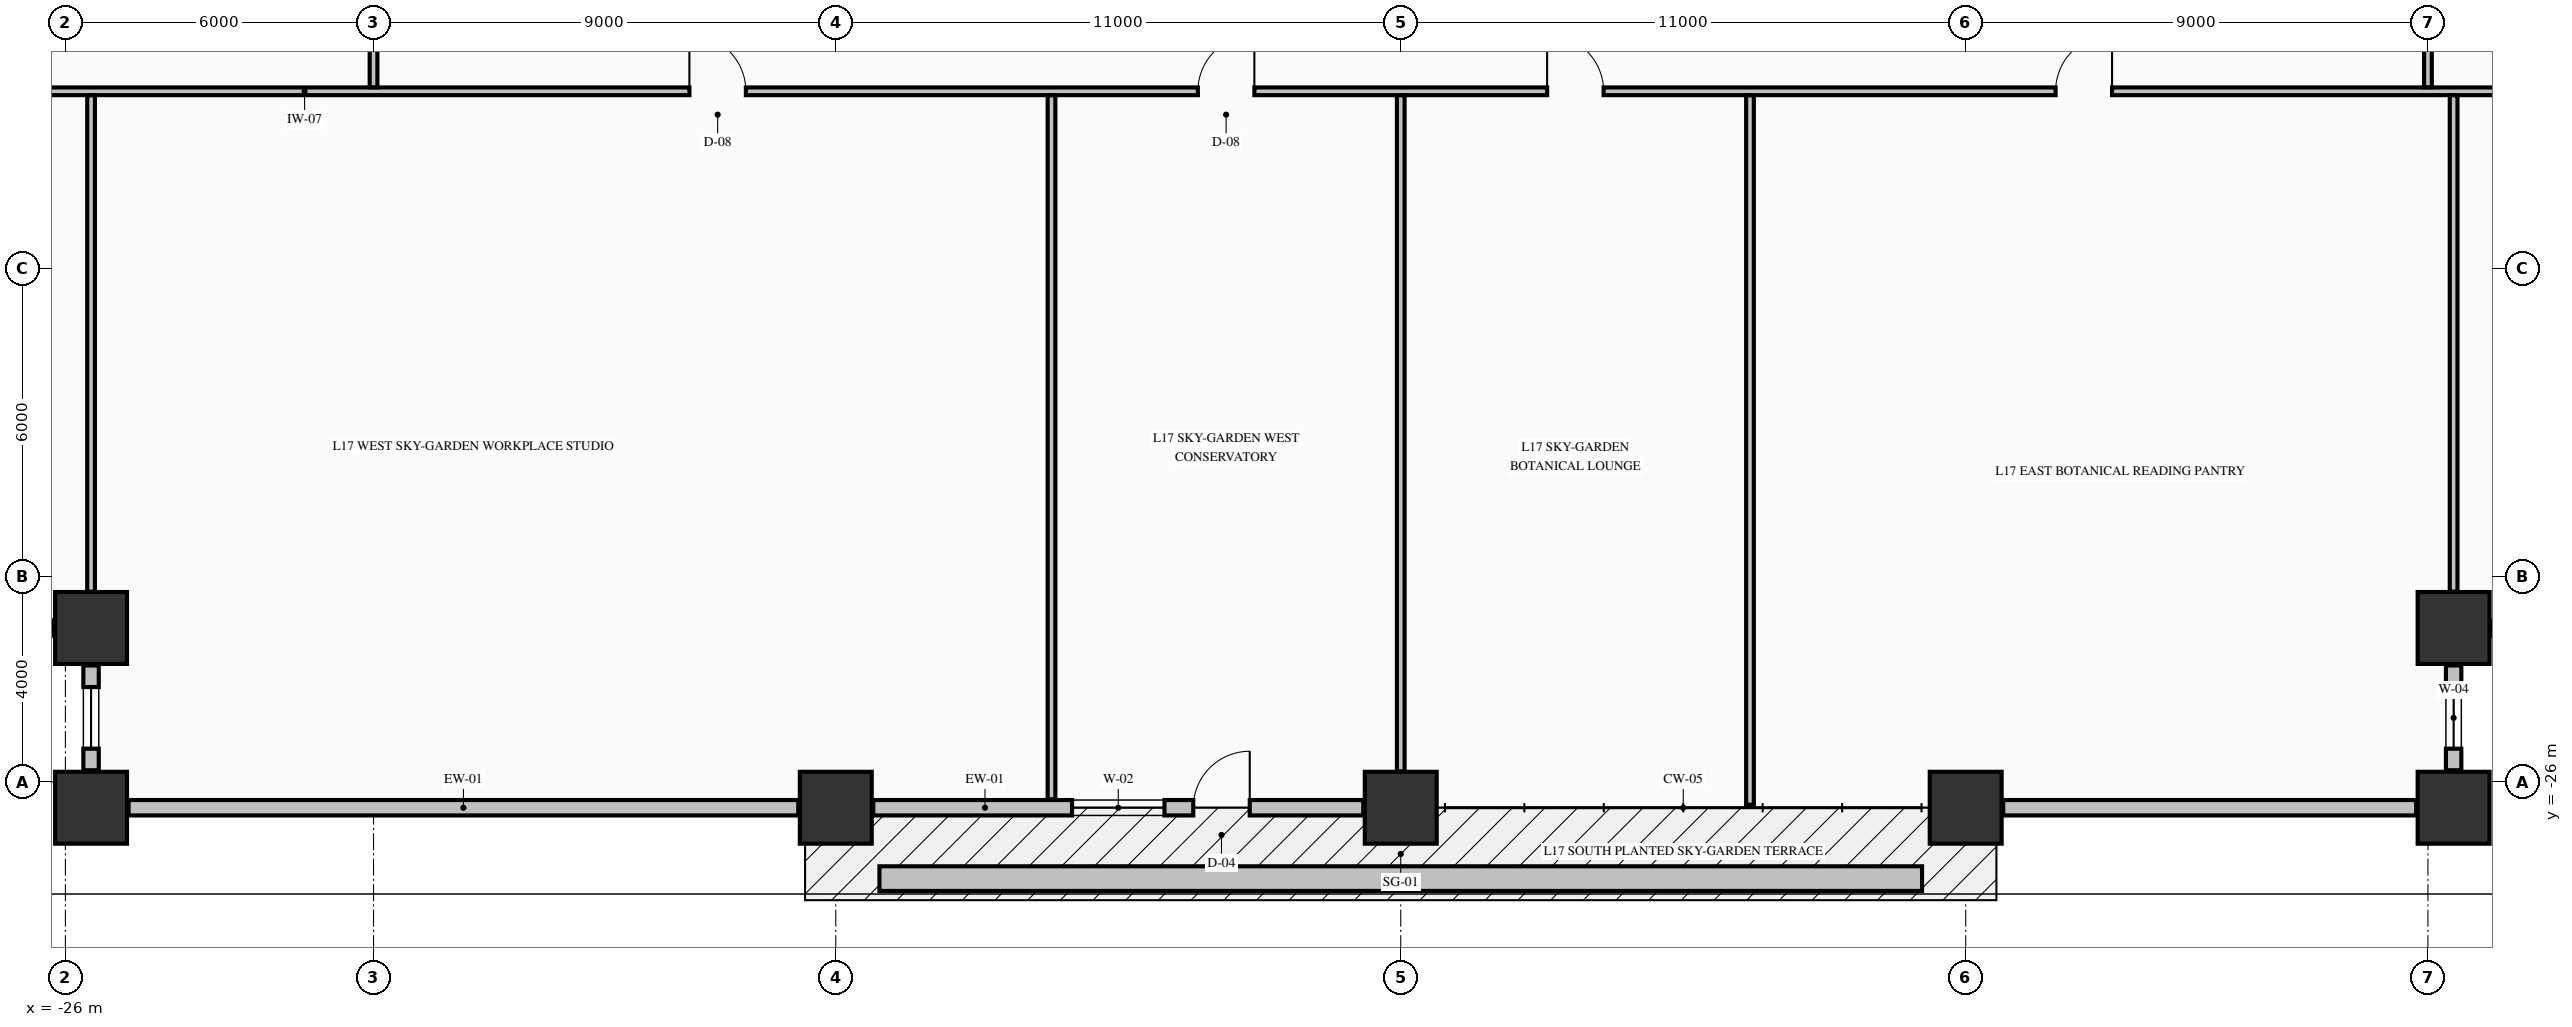
"""IFC4 building model, lengths in metres.
Left out: names, types, materials, properties, quantities, classifications, styles, units other than length and angle.
Written with IfcOpenShell. Run it as: python <this file> out.ifc"""

import sys

from ifc_helpers import new_model, si_unit, direction, frame, frame_2d, origin, origin_2d, place, context, subcontext, project, spatial, rectangle, extrude, element, fill, save


model = new_model("IFC4")
c1 = context("Model", 3, precision=1e-05, world=origin(), true_north=direction((0.0, 1.0)))
c2 = subcontext(c1, "Body", "Model", "MODEL_VIEW")
j1 = project(units=[si_unit("LENGTHUNIT", "METRE"), si_unit("PLANEANGLEUNIT", "RADIAN")], contexts=[c1])
p1 = place(None, origin())
s1 = spatial("IfcSite", under=j1, at=p1, CompositionType="ELEMENT")
p2 = place(p1, origin())
s2 = spatial("IfcBuilding", under=s1, at=p2, CompositionType="ELEMENT")
p3 = place(p2, frame((0.0, 0.0, 71.47)))
s3 = spatial("IfcBuildingStorey", under=s2, at=p3, CompositionType="ELEMENT", Elevation=71.47)
for number, where, z_axis, x_axis in (
    (1, (-25.5, -26.5, -0.325), (0.0, 0.0, 1.0), (1.0, 0.0, 0.0)),
    (2, (-11.0, -26.5, -0.325), (0.0, 0.0, 1.0), (1.0, 0.0, 0.0)),
    (3, (0.0, -26.5, -0.325), (0.0, 0.0, 1.0), (1.0, 0.0, 0.0)),
    (4, (11.0, -26.5, -0.325), (0.0, 0.0, 1.0), (1.0, 0.0, 0.0)),
    (5, (20.5, -26.5, -0.325), (0.0, 0.0, 1.0), (1.0, 0.0, 0.0)),
    (6, (-25.5, -23.0, -0.325), (0.0, 0.0, 1.0), (1.0, 0.0, 0.0)),
    (7, (20.5, -23.0, -0.325), (0.0, 0.0, 1.0), (1.0, 0.0, 0.0)),
):
    element("IfcColumn", number, at=place(p3, frame(where, z_axis=z_axis, x_axis=x_axis)), inside=s3, PredefinedType="COLUMN", context=c2, shape_type="SweptSolid", body=[
        extrude(rectangle(XDim=1.4, YDim=1.4, at=origin_2d()), origin(), (0.0, 0.0, 1.0), 3.645),
    ])
p4 = place(p3, frame((20.5, -25.77, 0.0), z_axis=(0.0, 0.0, 1.0), x_axis=(0.0, 1.0, 0.0)))
e8 = element("IfcWall", 8, at=p4, inside=s3, PredefinedType="STANDARD", context=c2, shape_type="SweptSolid", body=[
    extrude(rectangle(XDim=2.04, YDim=0.3, at=frame_2d((1.02, 0.0))), origin(), (0.0, 0.0, 1.0), 2.712),
])
p5 = place(p4, frame((0.42, 0.0, 0.82)))
e9 = element("IfcOpeningElement", 9, at=p5, cuts=e8, PredefinedType="OPENING", context=c2, shape_type="SweptSolid", body=[
    extrude(rectangle(XDim=1.2, YDim=1.65, at=frame_2d((0.6, 0.825))), frame((0.0, 0.16, 0.0), z_axis=(0.0, -1.0, 0.0), x_axis=(1.0, 0.0, 0.0)), (0.0, 0.0, 1.0), 0.32),
])
p6 = place(p3, frame((21.23, -23.0, 0.0), z_axis=(0.0, 0.0, 1.0), x_axis=(1.0, 0.0, 0.0)))
e10 = element("IfcWall", 10, at=p6, inside=s3, PredefinedType="STANDARD", context=c2, shape_type="SweptSolid", body=[
    extrude(rectangle(XDim=2.04, YDim=0.3, at=frame_2d((1.02, 0.0))), origin(), (0.0, 0.0, 1.0), 2.712),
])
p7 = place(p6, frame((0.42, 0.0, 0.82)))
e11 = element("IfcOpeningElement", 11, at=p7, cuts=e10, PredefinedType="OPENING", context=c2, shape_type="SweptSolid", body=[
    extrude(rectangle(XDim=1.2, YDim=1.65, at=frame_2d((0.6, 0.825))), frame((0.0, 0.16, 0.0), z_axis=(0.0, -1.0, 0.0), x_axis=(1.0, 0.0, 0.0)), (0.0, 0.0, 1.0), 0.32),
])
p8 = place(p3, frame((-28.27, -23.0, 0.0), z_axis=(0.0, 0.0, 1.0), x_axis=(1.0, 0.0, 0.0)))
e12 = element("IfcWall", 12, at=p8, inside=s3, PredefinedType="STANDARD", context=c2, shape_type="SweptSolid", body=[
    extrude(rectangle(XDim=2.04, YDim=0.3, at=frame_2d((1.02, 0.0))), origin(), (0.0, 0.0, 1.0), 2.712),
])
p9 = place(p8, frame((0.42, 0.0, 0.82)))
e13 = element("IfcOpeningElement", 13, at=p9, cuts=e12, PredefinedType="OPENING", context=c2, shape_type="SweptSolid", body=[
    extrude(rectangle(XDim=1.2, YDim=1.65, at=frame_2d((0.6, 0.825))), frame((0.0, 0.16, 0.0), z_axis=(0.0, -1.0, 0.0), x_axis=(1.0, 0.0, 0.0)), (0.0, 0.0, 1.0), 0.32),
])
p10 = place(p3, frame((-25.5, -23.73, 0.0), z_axis=(0.0, 0.0, 1.0), x_axis=(0.0, -1.0, 0.0)))
e14 = element("IfcWall", 14, at=p10, inside=s3, PredefinedType="STANDARD", context=c2, shape_type="SweptSolid", body=[
    extrude(rectangle(XDim=2.04, YDim=0.3, at=frame_2d((1.02, 0.0))), origin(), (0.0, 0.0, 1.0), 2.712),
])
p11 = place(p10, frame((0.42, 0.0, 0.82)))
e15 = element("IfcOpeningElement", 15, at=p11, cuts=e14, PredefinedType="OPENING", context=c2, shape_type="SweptSolid", body=[
    extrude(rectangle(XDim=1.2, YDim=1.65, at=frame_2d((0.6, 0.825))), frame((0.0, 0.16, 0.0), z_axis=(0.0, -1.0, 0.0), x_axis=(1.0, 0.0, 0.0)), (0.0, 0.0, 1.0), 0.32),
])
p12 = place(p3, frame((-24.77, -26.5, 0.0), z_axis=(0.0, 0.0, 1.0), x_axis=(1.0, 0.0, 0.0)))
e16 = element("IfcWall", 16, at=p12, inside=s3, PredefinedType="STANDARD", context=c2, shape_type="SweptSolid", body=[
    extrude(rectangle(XDim=13.04, YDim=0.3, at=frame_2d((6.52, 0.0))), origin(), (0.0, 0.0, 1.0), 2.712),
])
p13 = place(p3, frame((-10.27, -26.5, 0.0), z_axis=(0.0, 0.0, 1.0), x_axis=(1.0, 0.0, 0.0)))
e17 = element("IfcWall", 17, at=p13, inside=s3, PredefinedType="STANDARD", context=c2, shape_type="SweptSolid", body=[
    extrude(rectangle(XDim=9.54, YDim=0.3, at=frame_2d((4.77, 0.0))), origin(), (0.0, 0.0, 1.0), 2.712),
])
p14 = place(p13, frame((6.23, 0.0, 0.0)))
e18 = element("IfcOpeningElement", 18, at=p14, cuts=e17, PredefinedType="OPENING", context=c2, shape_type="SweptSolid", body=[
    extrude(rectangle(XDim=1.1, YDim=2.15, at=frame_2d((0.55, 1.075))), frame((0.0, 0.16, 0.0), z_axis=(0.0, -1.0, 0.0), x_axis=(1.0, 0.0, 0.0)), (0.0, 0.0, 1.0), 0.32),
])
p15 = place(p13, frame((3.87, 0.0, 0.78)))
e19 = element("IfcOpeningElement", 19, at=p15, cuts=e17, PredefinedType="OPENING", context=c2, shape_type="SweptSolid", body=[
    extrude(rectangle(XDim=1.8, YDim=1.72, at=frame_2d((0.9, 0.86))), frame((0.0, 0.16, 0.0), z_axis=(0.0, -1.0, 0.0), x_axis=(1.0, 0.0, 0.0)), (0.0, 0.0, 1.0), 0.32),
])
p16 = place(p3, frame((11.73, -26.5, 0.0), z_axis=(0.0, 0.0, 1.0), x_axis=(1.0, 0.0, 0.0)))
e20 = element("IfcWall", 20, at=p16, inside=s3, PredefinedType="STANDARD", context=c2, shape_type="SweptSolid", body=[
    extrude(rectangle(XDim=8.04, YDim=0.3, at=frame_2d((4.02, 0.0))), origin(), (0.0, 0.0, 1.0), 2.712),
])
p17 = place(p3, frame((-28.835, -12.55, 0.0), z_axis=(0.0, 0.0, 1.0), x_axis=(1.0, 0.0, 0.0)))
e21 = element("IfcWall", 21, at=p17, inside=s3, PredefinedType="PARTITIONING", context=c2, shape_type="SweptSolid", body=[
    extrude(rectangle(XDim=52.67, YDim=0.15, at=frame_2d((26.335, 0.0))), origin(), (0.0, 0.0, 1.0), 3.32),
])
p18 = place(p17, frame((14.985, 0.0, 0.0)))
e22 = element("IfcOpeningElement", 22, at=p18, cuts=e21, PredefinedType="OPENING", context=c2, shape_type="SweptSolid", body=[
    extrude(rectangle(XDim=1.1, YDim=2.15, at=frame_2d((0.55, 1.075))), frame((0.0, 0.085, 0.0), z_axis=(0.0, -1.0, 0.0), x_axis=(1.0, 0.0, 0.0)), (0.0, 0.0, 1.0), 0.17),
])
p19 = place(p17, frame((24.885, 0.0, 0.0)))
e23 = element("IfcOpeningElement", 23, at=p19, cuts=e21, PredefinedType="OPENING", context=c2, shape_type="SweptSolid", body=[
    extrude(rectangle(XDim=1.1, YDim=2.15, at=frame_2d((0.55, 1.075))), frame((0.0, 0.085, 0.0), z_axis=(0.0, -1.0, 0.0), x_axis=(1.0, 0.0, 0.0)), (0.0, 0.0, 1.0), 0.17),
])
p20 = place(p17, frame((31.685, 0.0, 0.0)))
e24 = element("IfcOpeningElement", 24, at=p20, cuts=e21, PredefinedType="OPENING", context=c2, shape_type="SweptSolid", body=[
    extrude(rectangle(XDim=1.1, YDim=2.15, at=frame_2d((0.55, 1.075))), frame((0.0, 0.085, 0.0), z_axis=(0.0, -1.0, 0.0), x_axis=(1.0, 0.0, 0.0)), (0.0, 0.0, 1.0), 0.17),
])
p21 = place(p17, frame((41.585, 0.0, 0.0)))
e25 = element("IfcOpeningElement", 25, at=p21, cuts=e21, PredefinedType="OPENING", context=c2, shape_type="SweptSolid", body=[
    extrude(rectangle(XDim=1.1, YDim=2.15, at=frame_2d((0.55, 1.075))), frame((0.0, 0.085, 0.0), z_axis=(0.0, -1.0, 0.0), x_axis=(1.0, 0.0, 0.0)), (0.0, 0.0, 1.0), 0.17),
])
p22 = place(p3, frame((-25.5, -22.294, 0.0), z_axis=(0.0, 0.0, 1.0), x_axis=(0.0, 1.0, 0.0)))
e26 = element("IfcWall", 26, at=p22, inside=s3, PredefinedType="PARTITIONING", context=c2, shape_type="SweptSolid", body=[
    extrude(rectangle(XDim=9.666, YDim=0.15, at=frame_2d((4.833, 0.0))), origin(), (0.0, 0.0, 1.0), 3.32),
])
p23 = place(p3, frame((-20.0, -12.472, 0.0), z_axis=(0.0, 0.0, 1.0), x_axis=(0.0, 1.0, 0.0)))
e27 = element("IfcWall", 27, at=p23, inside=s3, PredefinedType="PARTITIONING", context=c2, shape_type="SweptSolid", body=[
    extrude(rectangle(XDim=1.916, YDim=0.15, at=frame_2d((0.958, 0.0))), origin(), (0.0, 0.0, 1.0), 2.66),
])
p24 = place(p23, frame((0.747, 0.0, 0.0)))
e28 = element("IfcOpeningElement", 28, at=p24, cuts=e27, PredefinedType="OPENING", context=c2, shape_type="SweptSolid", body=[
    extrude(rectangle(XDim=0.95, YDim=2.15, at=frame_2d((0.475, 1.075))), frame((0.0, 0.085, 0.0), z_axis=(0.0, -1.0, 0.0), x_axis=(1.0, 0.0, 0.0)), (0.0, 0.0, 1.0), 0.17),
])
p25 = place(p3, frame((-6.8, -26.335, 0.0), z_axis=(0.0, 0.0, 1.0), x_axis=(0.0, 1.0, 0.0)))
e29 = element("IfcWall", 29, at=p25, inside=s3, PredefinedType="PARTITIONING", context=c2, shape_type="SweptSolid", body=[
    extrude(rectangle(XDim=13.707, YDim=0.15, at=frame_2d((6.854, 0.0))), origin(), (0.0, 0.0, 1.0), 3.32),
])
p26 = place(p3, frame((0.0, -25.794, 0.0), z_axis=(0.0, 0.0, 1.0), x_axis=(0.0, 1.0, 0.0)))
e30 = element("IfcWall", 30, at=p26, inside=s3, PredefinedType="PARTITIONING", context=c2, shape_type="SweptSolid", body=[
    extrude(rectangle(XDim=13.166, YDim=0.15, at=frame_2d((6.583, 0.0))), origin(), (0.0, 0.0, 1.0), 3.32),
])
p27 = place(p3, frame((6.8, -26.44, 0.0), z_axis=(0.0, 0.0, 1.0), x_axis=(0.0, 1.0, 0.0)))
e31 = element("IfcWall", 31, at=p27, inside=s3, PredefinedType="PARTITIONING", context=c2, shape_type="SweptSolid", body=[
    extrude(rectangle(XDim=13.812, YDim=0.15, at=frame_2d((6.906, 0.0))), origin(), (0.0, 0.0, 1.0), 3.32),
])
p28 = place(p3, frame((20.0, -12.472, 0.0), z_axis=(0.0, 0.0, 1.0), x_axis=(0.0, 1.0, 0.0)))
e32 = element("IfcWall", 32, at=p28, inside=s3, PredefinedType="PARTITIONING", context=c2, shape_type="SweptSolid", body=[
    extrude(rectangle(XDim=1.916, YDim=0.15, at=frame_2d((0.958, 0.0))), origin(), (0.0, 0.0, 1.0), 3.32),
])
p29 = place(p28, frame((0.747, 0.0, 0.0)))
e33 = element("IfcOpeningElement", 33, at=p29, cuts=e32, PredefinedType="OPENING", context=c2, shape_type="SweptSolid", body=[
    extrude(rectangle(XDim=0.95, YDim=2.15, at=frame_2d((0.475, 1.075))), frame((0.0, 0.085, 0.0), z_axis=(0.0, -1.0, 0.0), x_axis=(1.0, 0.0, 0.0)), (0.0, 0.0, 1.0), 0.17),
])
p30 = place(p3, frame((20.5, -22.294, 0.0), z_axis=(0.0, 0.0, 1.0), x_axis=(0.0, 1.0, 0.0)))
e34 = element("IfcWall", 34, at=p30, inside=s3, PredefinedType="PARTITIONING", context=c2, shape_type="SweptSolid", body=[
    extrude(rectangle(XDim=9.666, YDim=0.15, at=frame_2d((4.833, 0.0))), origin(), (0.0, 0.0, 1.0), 3.32),
])
p31 = place(p3, frame((-10.15, -27.88, -0.04), z_axis=(0.0, 0.0, 1.0), x_axis=(1.0, 0.0, 0.0)))
e35 = element("IfcWall", 35, at=p31, inside=s3, PredefinedType="PARAPET", context=c2, shape_type="SweptSolid", body=[
    extrude(rectangle(XDim=20.3, YDim=0.48, at=frame_2d((10.15, 0.0))), origin(), (0.0, 0.0, 1.0), 0.52),
])
p32 = place(p5, origin())
e36 = element("IfcWindow", 36, at=p32, inside=s3, PartitioningType="SINGLE_PANEL", PredefinedType="WINDOW", context=c2, shape_type="SweptSolid", body=[
    extrude(rectangle(XDim=1.2, YDim=1.65, at=frame_2d((0.6, 0.825))), frame((0.0, 0.03, 0.0), z_axis=(0.0, -1.0, 0.0), x_axis=(1.0, 0.0, 0.0)), (0.0, 0.0, 1.0), 0.06),
])
fill(e9, e36)
p33 = place(p11, origin())
e37 = element("IfcWindow", 37, at=p33, inside=s3, PartitioningType="SINGLE_PANEL", PredefinedType="WINDOW", context=c2, shape_type="SweptSolid", body=[
    extrude(rectangle(XDim=1.2, YDim=1.65, at=frame_2d((0.6, 0.825))), frame((0.0, 0.03, 0.0), z_axis=(0.0, -1.0, 0.0), x_axis=(1.0, 0.0, 0.0)), (0.0, 0.0, 1.0), 0.06),
])
fill(e15, e37)
p34 = place(p14, origin())
e38 = element("IfcDoor", 38, at=p34, inside=s3, OperationType="SINGLE_SWING_RIGHT", PredefinedType="DOOR", context=c2, shape_type="SweptSolid", body=[
    extrude(rectangle(XDim=1.1, YDim=2.15, at=frame_2d((0.55, 1.075))), frame((0.0, 0.025, 0.0), z_axis=(0.0, -1.0, 0.0), x_axis=(1.0, 0.0, 0.0)), (0.0, 0.0, 1.0), 0.05),
])
fill(e18, e38)
p35 = place(p15, origin())
e39 = element("IfcWindow", 39, at=p35, inside=s3, PartitioningType="SINGLE_PANEL", PredefinedType="WINDOW", context=c2, shape_type="SweptSolid", body=[
    extrude(rectangle(XDim=1.8, YDim=1.72, at=frame_2d((0.9, 0.86))), frame((0.0, 0.03, 0.0), z_axis=(0.0, -1.0, 0.0), x_axis=(1.0, 0.0, 0.0)), (0.0, 0.0, 1.0), 0.06),
])
fill(e19, e39)
p36 = place(p18, origin())
e40 = element("IfcDoor", 40, at=p36, inside=s3, OperationType="SINGLE_SWING_LEFT", PredefinedType="DOOR", context=c2, shape_type="SweptSolid", body=[
    extrude(rectangle(XDim=1.1, YDim=2.15, at=frame_2d((0.55, 1.075))), frame((0.0, 0.025, 0.0), z_axis=(0.0, -1.0, 0.0), x_axis=(1.0, 0.0, 0.0)), (0.0, 0.0, 1.0), 0.05),
])
fill(e22, e40)
p37 = place(p19, origin())
e41 = element("IfcDoor", 41, at=p37, inside=s3, OperationType="SINGLE_SWING_RIGHT", PredefinedType="DOOR", context=c2, shape_type="SweptSolid", body=[
    extrude(rectangle(XDim=1.1, YDim=2.15, at=frame_2d((0.55, 1.075))), frame((0.0, 0.025, 0.0), z_axis=(0.0, -1.0, 0.0), x_axis=(1.0, 0.0, 0.0)), (0.0, 0.0, 1.0), 0.05),
])
fill(e23, e41)
p38 = place(p20, origin())
e42 = element("IfcDoor", 42, at=p38, inside=s3, OperationType="SINGLE_SWING_LEFT", PredefinedType="DOOR", context=c2, shape_type="SweptSolid", body=[
    extrude(rectangle(XDim=1.1, YDim=2.15, at=frame_2d((0.55, 1.075))), frame((0.0, 0.025, 0.0), z_axis=(0.0, -1.0, 0.0), x_axis=(1.0, 0.0, 0.0)), (0.0, 0.0, 1.0), 0.05),
])
fill(e24, e42)
p39 = place(p21, origin())
e43 = element("IfcDoor", 43, at=p39, inside=s3, OperationType="SINGLE_SWING_RIGHT", PredefinedType="DOOR", context=c2, shape_type="SweptSolid", body=[
    extrude(rectangle(XDim=1.1, YDim=2.15, at=frame_2d((0.55, 1.075))), frame((0.0, 0.025, 0.0), z_axis=(0.0, -1.0, 0.0), x_axis=(1.0, 0.0, 0.0)), (0.0, 0.0, 1.0), 0.05),
])
fill(e25, e43)
save(model, sys.argv[1])
